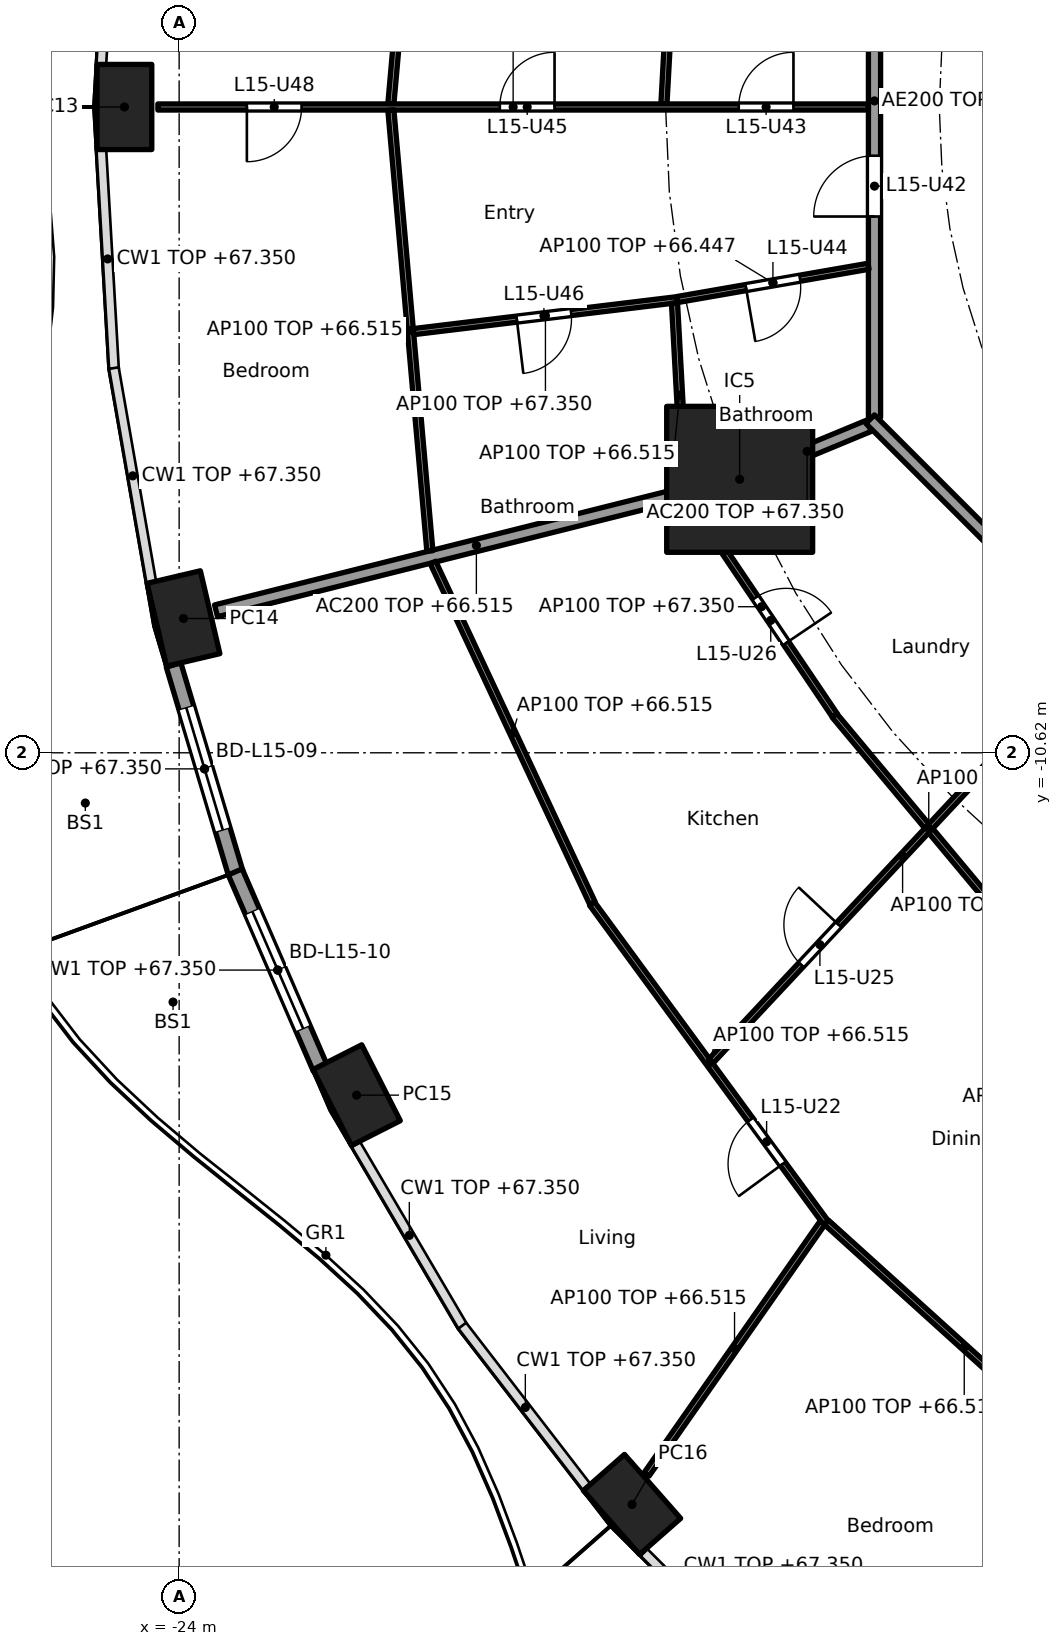
"""IFC4 building model, lengths in metres.
Left out: names, types, materials, properties, quantities, classifications, styles, units other than length and angle.
Written with IfcOpenShell. Run it as: python <this file> out.ifc"""

import sys

from ifc_helpers import new_model, si_unit, direction, frame, frame_2d, origin, origin_2d, place, context, subcontext, project, spatial, rectangle, hollow_rectangle, extrude, element, fill, save


model = new_model("IFC4")
c1 = context("Model", 3, precision=1e-05, world=origin(), true_north=direction((0.0, 1.0)))
c2 = subcontext(c1, "Body", "Model", "MODEL_VIEW")
j1 = project(units=[si_unit("LENGTHUNIT", "METRE"), si_unit("PLANEANGLEUNIT", "RADIAN")], contexts=[c1])
p1 = place(None, origin())
s1 = spatial("IfcSite", under=j1, at=p1, CompositionType="ELEMENT")
p2 = place(p1, origin())
s2 = spatial("IfcBuilding", under=s1, at=p2, CompositionType="ELEMENT")
p3 = place(p2, frame((0.0, 0.0, 64.0)))
s3 = spatial("IfcBuildingStorey", under=s2, at=p3, CompositionType="ELEMENT", Elevation=64.0)
for number, where, z_axis, x_axis in (
    (1, (-24.9, 0.0, 0.0), (0.0, 0.0, 1.0), (0.0, -1.0, 0.0)),
    (2, (-23.929, -8.412, 0.0), (0.0, 0.0, 1.0), (0.229, -0.973, 0.0)),
    (3, (-21.082, -16.25, 0.0), (0.0, 0.0, 1.0), (0.452, -0.892, 0.0)),
    (4, (-16.552, -22.981, 0.0), (0.0, 0.0, 1.0), (0.66, -0.751, 0.0)),
):
    element("IfcColumn", number, at=place(p3, frame(where, z_axis=z_axis, x_axis=x_axis)), inside=s3, PredefinedType="COLUMN", context=c2, shape_type="SweptSolid", body=[
        extrude(hollow_rectangle(XDim=1.4, YDim=0.9, WallThickness=0.05, at=origin_2d()), origin(), (0.0, 0.0, 1.0), 3.7),
    ])
p4 = place(p3, frame((-14.782, -6.123, 0.0), z_axis=(0.0, 0.0, 1.0), x_axis=(1.0, 0.0, 0.0)))
e5 = element("IfcColumn", 5, at=p4, inside=s3, PredefinedType="COLUMN", context=c2, shape_type="SweptSolid", body=[
    extrude(rectangle(XDim=2.4, YDim=2.4, at=origin_2d()), origin(), (0.0, 0.0, 1.0), 3.7),
])
p5 = place(p3, frame((-23.073, -12.593, 0.0), z_axis=(0.0, 0.0, 1.0), x_axis=(-0.285871309426, 0.958268018065, 0.0)))
e6 = element("IfcWall", 6, at=p5, inside=s3, PredefinedType="SOLIDWALL", context=c2, shape_type="SweptSolid", body=[
    extrude(rectangle(XDim=3.565, YDim=0.25, at=frame_2d((1.783, 0.0))), origin(), (0.0, 0.0, 1.0), 3.35),
])
p6 = place(p5, frame((0.733, 0.0, 0.0)))
e7 = element("IfcOpeningElement", 7, at=p6, cuts=e6, PredefinedType="OPENING", context=c2, shape_type="SweptSolid", body=[
    extrude(rectangle(XDim=2.1, YDim=2.4, at=frame_2d((1.05, 1.2))), frame((0.0, 0.135, 0.0), z_axis=(0.0, -1.0, 0.0), x_axis=(1.0, 0.0, 0.0)), (0.0, 0.0, 1.0), 0.27),
])
p7 = place(p3, frame((-21.678, -15.808, 0.0), z_axis=(0.0, 0.0, 1.0), x_axis=(-0.397624958345, 0.917548032803, 0.0)))
e8 = element("IfcWall", 8, at=p7, inside=s3, PredefinedType="SOLIDWALL", context=c2, shape_type="SweptSolid", body=[
    extrude(rectangle(XDim=3.52, YDim=0.25, at=frame_2d((1.76, 0.0))), origin(), (0.0, 0.0, 1.0), 3.35),
])
p8 = place(p7, frame((0.71, 0.0, 0.0)))
e9 = element("IfcOpeningElement", 9, at=p8, cuts=e8, PredefinedType="OPENING", context=c2, shape_type="SweptSolid", body=[
    extrude(rectangle(XDim=2.1, YDim=2.4, at=frame_2d((1.05, 1.2))), frame((0.0, 0.135, 0.0), z_axis=(0.0, -1.0, 0.0), x_axis=(1.0, 0.0, 0.0)), (0.0, 0.0, 1.0), 0.27),
])
p9 = place(p3, frame((-12.657, -5.243, 0.0), z_axis=(0.0, 0.0, 1.0), x_axis=(-0.923885664896, -0.382668627144, 0.0)))
e10 = element("IfcWall", 10, at=p9, inside=s3, PredefinedType="PARTITIONING", context=c2, shape_type="SweptSolid", body=[
    extrude(rectangle(XDim=2.2, YDim=0.2, at=frame_2d((1.1, 0.0))), origin(), (0.0, 0.0, 1.0), 3.35),
])
p10 = place(p3, frame((-14.831, -6.135, 0.0), z_axis=(0.0, 0.0, 1.0), x_axis=(-0.969884949569, -0.243563512454, 0.0)))
e11 = element("IfcWall", 11, at=p10, inside=s3, PredefinedType="PARTITIONING", context=c2, shape_type="SweptSolid", body=[
    extrude(rectangle(XDim=8.829, YDim=0.2, at=frame_2d((4.415, 0.0))), origin(), (0.0, 0.0, 1.0), 2.515),
])
p11 = place(p3, frame((-12.565, 5.304, 0.0), z_axis=(0.0, 0.0, 1.0), x_axis=(0.0, -1.0, 0.0)))
e12 = element("IfcWall", 12, at=p11, inside=s3, PredefinedType="PARTITIONING", context=c2, shape_type="SweptSolid", body=[
    extrude(rectangle(XDim=10.409, YDim=0.2, at=frame_2d((5.205, 0.0))), origin(), (0.0, 0.0, 1.0), 3.35),
])
p12 = place(p11, frame((6.106, 0.0, 0.0)))
e13 = element("IfcOpeningElement", 13, at=p12, cuts=e12, PredefinedType="OPENING", context=c2, shape_type="SweptSolid", body=[
    extrude(rectangle(XDim=1.0, YDim=2.1, at=frame_2d((0.5, 1.05))), frame((0.0, 0.11, 0.0), z_axis=(0.0, -1.0, 0.0), x_axis=(1.0, 0.0, 0.0)), (0.0, 0.0, 1.0), 0.22),
])
p13 = place(p3, frame((-12.635, -5.134, 0.0), z_axis=(0.0, 0.0, 1.0), x_axis=(0.707106781187, -0.707106781187, 0.0)))
e14 = element("IfcWall", 14, at=p13, inside=s3, PredefinedType="PARTITIONING", context=c2, shape_type="SweptSolid", body=[
    extrude(rectangle(XDim=10.609, YDim=0.2, at=frame_2d((5.305, 0.0))), origin(), (0.0, 0.0, 1.0), 3.35),
])
p14 = place(p3, frame((-15.686, 6.299, 0.0), z_axis=(0.0, 0.0, 1.0), x_axis=(-0.054651178503, -0.99850550759, 0.0)))
e15 = element("IfcWall", 15, at=p14, inside=s3, PredefinedType="PARTITIONING", context=c2, shape_type="SweptSolid", body=[
    extrude(rectangle(XDim=6.259, YDim=0.1, at=frame_2d((3.129, 0.0))), origin(), (0.0, 0.0, 1.0), 2.515),
])
p15 = place(p3, frame((-19.864, 7.45, 0.0), z_axis=(0.0, 0.0, 1.0), x_axis=(-0.088138375539, -0.996108240483, 0.0)))
e16 = element("IfcWall", 16, at=p15, inside=s3, PredefinedType="PARTITIONING", context=c2, shape_type="SweptSolid", body=[
    extrude(rectangle(XDim=7.429, YDim=0.1, at=frame_2d((3.714, 0.0))), origin(), (0.0, 0.0, 1.0), 2.515),
])
p16 = place(p15, frame((3.29, 0.0, 0.0)))
e17 = element("IfcOpeningElement", 17, at=p16, cuts=e16, PredefinedType="OPENING", context=c2, shape_type="SweptSolid", body=[
    extrude(rectangle(XDim=0.9, YDim=2.1, at=frame_2d((0.45, 1.05))), frame((0.0, 0.06, 0.0), z_axis=(0.0, -1.0, 0.0), x_axis=(1.0, 0.0, 0.0)), (0.0, 0.0, 1.0), 0.12),
])
p17 = place(p3, frame((-12.665, 0.0, 0.0), z_axis=(0.0, 0.0, 1.0), x_axis=(-1.0, 0.0, 0.0)))
e18 = element("IfcWall", 18, at=p17, inside=s3, PredefinedType="PARTITIONING", context=c2, shape_type="SweptSolid", body=[
    extrude(rectangle(XDim=11.685, YDim=0.1, at=frame_2d((5.843, 0.0))), origin(), (0.0, 0.0, 1.0), 2.447),
])
p18 = place(p17, frame((1.233, 0.0, 0.0)))
e19 = element("IfcOpeningElement", 19, at=p18, cuts=e18, PredefinedType="OPENING", context=c2, shape_type="SweptSolid", body=[
    extrude(rectangle(XDim=0.9, YDim=2.1, at=frame_2d((0.45, 1.05))), frame((0.0, 0.06, 0.0), z_axis=(0.0, -1.0, 0.0), x_axis=(1.0, 0.0, 0.0)), (0.0, 0.0, 1.0), 0.12),
])
p19 = place(p17, frame((5.162, 0.0, 0.0)))
e20 = element("IfcOpeningElement", 20, at=p19, cuts=e18, PredefinedType="OPENING", context=c2, shape_type="SweptSolid", body=[
    extrude(rectangle(XDim=0.9, YDim=2.1, at=frame_2d((0.45, 1.05))), frame((0.0, 0.06, 0.0), z_axis=(0.0, -1.0, 0.0), x_axis=(1.0, 0.0, 0.0)), (0.0, 0.0, 1.0), 0.12),
])
p20 = place(p17, frame((9.322, 0.0, 0.0)))
e21 = element("IfcOpeningElement", 21, at=p20, cuts=e18, PredefinedType="OPENING", context=c2, shape_type="SweptSolid", body=[
    extrude(rectangle(XDim=0.9, YDim=2.1, at=frame_2d((0.45, 1.05))), frame((0.0, 0.06, 0.0), z_axis=(0.0, -1.0, 0.0), x_axis=(1.0, 0.0, 0.0)), (0.0, 0.0, 1.0), 0.12),
])
p21 = place(p3, frame((-20.518, -0.05, 0.0), z_axis=(0.0, 0.0, 1.0), x_axis=(0.088143415068, -0.996107794558, 0.0)))
e22 = element("IfcWall", 22, at=p21, inside=s3, PredefinedType="PARTITIONING", context=c2, shape_type="SweptSolid", body=[
    extrude(rectangle(XDim=7.279, YDim=0.1, at=frame_2d((3.64, 0.0))), origin(), (0.0, 0.0, 1.0), 2.515),
])
p22 = place(p3, frame((-12.663, -2.619, 0.0), z_axis=(0.0, 0.0, 1.0), x_axis=(-0.985220176102, -0.171292745325, 0.0)))
e23 = element("IfcWall", 23, at=p22, inside=s3, PredefinedType="PARTITIONING", context=c2, shape_type="SweptSolid", body=[
    extrude(rectangle(XDim=3.191, YDim=0.1, at=frame_2d((1.596, 0.0))), origin(), (0.0, 0.0, 1.0), 2.447),
])
p23 = place(p22, frame((1.146, 0.0, 0.0)))
e24 = element("IfcOpeningElement", 24, at=p23, cuts=e23, PredefinedType="OPENING", context=c2, shape_type="SweptSolid", body=[
    extrude(rectangle(XDim=0.9, YDim=2.1, at=frame_2d((0.45, 1.05))), frame((0.0, 0.06, 0.0), z_axis=(0.0, -1.0, 0.0), x_axis=(1.0, 0.0, 0.0)), (0.0, 0.0, 1.0), 0.12),
])
p24 = place(p3, frame((-15.807, -3.168, 0.0), z_axis=(0.0, 0.0, 1.0), x_axis=(-0.992741666002, -0.120266306938, 0.0)))
e25 = element("IfcWall", 25, at=p24, inside=s3, PredefinedType="PARTITIONING", context=c2, shape_type="SweptSolid", body=[
    extrude(rectangle(XDim=4.371, YDim=0.1, at=frame_2d((2.185, 0.0))), origin(), (0.0, 0.0, 1.0), 3.35),
])
p25 = place(p24, frame((1.76, 0.0, 0.0)))
e26 = element("IfcOpeningElement", 26, at=p25, cuts=e25, PredefinedType="OPENING", context=c2, shape_type="SweptSolid", body=[
    extrude(rectangle(XDim=0.9, YDim=2.1, at=frame_2d((0.45, 1.05))), frame((0.0, 0.06, 0.0), z_axis=(0.0, -1.0, 0.0), x_axis=(1.0, 0.0, 0.0)), (0.0, 0.0, 1.0), 0.12),
])
p26 = place(p3, frame((-15.854, -3.225, 0.0), z_axis=(0.0, 0.0, 1.0), x_axis=(0.054644199943, -0.998505889523, 0.0)))
e27 = element("IfcWall", 27, at=p26, inside=s3, PredefinedType="PARTITIONING", context=c2, shape_type="SweptSolid", body=[
    extrude(rectangle(XDim=3.029, YDim=0.1, at=frame_2d((1.515, 0.0))), origin(), (0.0, 0.0, 1.0), 2.515),
])
p27 = place(p3, frame((-15.627, -6.432, 0.0), z_axis=(0.0, 0.0, 1.0), x_axis=(0.559112679527, -0.829091678641, 0.0)))
e28 = element("IfcWall", 28, at=p27, inside=s3, PredefinedType="PARTITIONING", context=c2, shape_type="SweptSolid", body=[
    extrude(rectangle(XDim=4.308, YDim=0.1, at=frame_2d((2.154, 0.0))), origin(), (0.0, 0.0, 1.0), 3.35),
])
p28 = place(p27, frame((1.975, 0.0, 0.0)))
e29 = element("IfcOpeningElement", 29, at=p28, cuts=e28, PredefinedType="OPENING", context=c2, shape_type="SweptSolid", body=[
    extrude(rectangle(XDim=0.9, YDim=2.1, at=frame_2d((0.45, 1.05))), frame((0.0, 0.06, 0.0), z_axis=(0.0, -1.0, 0.0), x_axis=(1.0, 0.0, 0.0)), (0.0, 0.0, 1.0), 0.12),
])
p29 = place(p3, frame((-19.826, -7.491, 0.0), z_axis=(0.0, 0.0, 1.0), x_axis=(0.423926333401, -0.905696673202, 0.0)))
e30 = element("IfcWall", 30, at=p29, inside=s3, PredefinedType="PARTITIONING", context=c2, shape_type="SweptSolid", body=[
    extrude(rectangle(XDim=6.188, YDim=0.1, at=frame_2d((3.094, 0.0))), origin(), (0.0, 0.0, 1.0), 2.515),
])
p30 = place(p3, frame((-13.222, -10.007, 0.0), z_axis=(0.0, 0.0, 1.0), x_axis=(0.64083455704, -0.767679015282, 0.0)))
e31 = element("IfcWall", 31, at=p30, inside=s3, PredefinedType="PARTITIONING", context=c2, shape_type="SweptSolid", body=[
    extrude(rectangle(XDim=4.837, YDim=0.1, at=frame_2d((2.418, 0.0))), origin(), (0.0, 0.0, 1.0), 2.515),
])
p31 = place(p3, frame((-17.211, -13.1, 0.0), z_axis=(0.0, 0.0, 1.0), x_axis=(0.591191311491, -0.806531359104, 0.0)))
e32 = element("IfcWall", 32, at=p31, inside=s3, PredefinedType="PARTITIONING", context=c2, shape_type="SweptSolid", body=[
    extrude(rectangle(XDim=6.51, YDim=0.1, at=frame_2d((3.255, 0.0))), origin(), (0.0, 0.0, 1.0), 2.515),
])
p32 = place(p31, frame((4.407, 0.0, 0.0)))
e33 = element("IfcOpeningElement", 33, at=p32, cuts=e32, PredefinedType="OPENING", context=c2, shape_type="SweptSolid", body=[
    extrude(rectangle(XDim=0.9, YDim=2.1, at=frame_2d((0.45, 1.05))), frame((0.0, 0.06, 0.0), z_axis=(0.0, -1.0, 0.0), x_axis=(1.0, 0.0, 0.0)), (0.0, 0.0, 1.0), 0.12),
])
p33 = place(p3, frame((-8.953, -8.958, 0.0), z_axis=(0.0, 0.0, 1.0), x_axis=(-0.683322485948, -0.730116689439, 0.0)))
e34 = element("IfcWall", 34, at=p33, inside=s3, PredefinedType="PARTITIONING", context=c2, shape_type="SweptSolid", body=[
    extrude(rectangle(XDim=9.219, YDim=0.1, at=frame_2d((4.609, 0.0))), origin(), (0.0, 0.0, 1.0), 2.447),
])
p34 = place(p33, frame((6.149, 0.0, 0.0)))
e35 = element("IfcOpeningElement", 35, at=p34, cuts=e34, PredefinedType="OPENING", context=c2, shape_type="SweptSolid", body=[
    extrude(rectangle(XDim=0.9, YDim=2.1, at=frame_2d((0.45, 1.05))), frame((0.0, 0.06, 0.0), z_axis=(0.0, -1.0, 0.0), x_axis=(1.0, 0.0, 0.0)), (0.0, 0.0, 1.0), 0.12),
])
p35 = place(p3, frame((-13.42, -18.351, 0.0), z_axis=(0.0, 0.0, 1.0), x_axis=(-0.573127875153, -0.819465947262, 0.0)))
e36 = element("IfcWall", 36, at=p35, inside=s3, PredefinedType="PARTITIONING", context=c2, shape_type="SweptSolid", body=[
    extrude(rectangle(XDim=5.047, YDim=0.1, at=frame_2d((2.523, 0.0))), origin(), (0.0, 0.0, 1.0), 2.515),
])
p36 = place(p3, frame((-13.355, -18.343, 0.0), z_axis=(0.0, 0.0, 1.0), x_axis=(0.741722263338, -0.670707152242, 0.0)))
e37 = element("IfcWall", 37, at=p36, inside=s3, PredefinedType="PARTITIONING", context=c2, shape_type="SweptSolid", body=[
    extrude(rectangle(XDim=6.109, YDim=0.1, at=frame_2d((3.055, 0.0))), origin(), (0.0, 0.0, 1.0), 2.515),
])
p37 = place(p6, origin())
e38 = element("IfcDoor", 38, at=p37, inside=s3, OperationType="SLIDING_TO_LEFT", PredefinedType="DOOR", context=c2, shape_type="SweptSolid", body=[
    extrude(rectangle(XDim=2.1, YDim=2.4, at=frame_2d((1.05, 1.2))), frame((0.0, 0.025, 0.0), z_axis=(0.0, -1.0, 0.0), x_axis=(1.0, 0.0, 0.0)), (0.0, 0.0, 1.0), 0.05),
])
fill(e7, e38)
p38 = place(p8, origin())
e39 = element("IfcDoor", 39, at=p38, inside=s3, OperationType="SLIDING_TO_LEFT", PredefinedType="DOOR", context=c2, shape_type="SweptSolid", body=[
    extrude(rectangle(XDim=2.1, YDim=2.4, at=frame_2d((1.05, 1.2))), frame((0.0, 0.025, 0.0), z_axis=(0.0, -1.0, 0.0), x_axis=(1.0, 0.0, 0.0)), (0.0, 0.0, 1.0), 0.05),
])
fill(e9, e39)
p39 = place(p32, frame((0.9, 0.0, 0.0), x_axis=(-1.0, 0.0, 0.0)))
e40 = element("IfcDoor", 40, at=p39, inside=s3, OperationType="SINGLE_SWING_LEFT", PredefinedType="DOOR", context=c2, shape_type="SweptSolid", body=[
    extrude(rectangle(XDim=0.9, YDim=2.1, at=frame_2d((0.45, 1.05))), frame((0.0, 0.025, 0.0), z_axis=(0.0, -1.0, 0.0), x_axis=(1.0, 0.0, 0.0)), (0.0, 0.0, 1.0), 0.05),
])
fill(e33, e40)
p40 = place(p34, frame((0.9, 0.0, 0.0), x_axis=(-1.0, 0.0, 0.0)))
e41 = element("IfcDoor", 41, at=p40, inside=s3, OperationType="SINGLE_SWING_RIGHT", PredefinedType="DOOR", context=c2, shape_type="SweptSolid", body=[
    extrude(rectangle(XDim=0.9, YDim=2.1, at=frame_2d((0.45, 1.05))), frame((0.0, 0.025, 0.0), z_axis=(0.0, -1.0, 0.0), x_axis=(1.0, 0.0, 0.0)), (0.0, 0.0, 1.0), 0.05),
])
fill(e35, e41)
p41 = place(p28, origin())
e42 = element("IfcDoor", 42, at=p41, inside=s3, OperationType="SINGLE_SWING_RIGHT", PredefinedType="DOOR", context=c2, shape_type="SweptSolid", body=[
    extrude(rectangle(XDim=0.9, YDim=2.1, at=frame_2d((0.45, 1.05))), frame((0.0, 0.025, 0.0), z_axis=(0.0, -1.0, 0.0), x_axis=(1.0, 0.0, 0.0)), (0.0, 0.0, 1.0), 0.05),
])
fill(e29, e42)
p42 = place(p12, frame((1.0, 0.0, 0.0), x_axis=(-1.0, 0.0, 0.0)))
e43 = element("IfcDoor", 43, at=p42, inside=s3, OperationType="SINGLE_SWING_LEFT", PredefinedType="DOOR", context=c2, shape_type="SweptSolid", body=[
    extrude(rectangle(XDim=1.0, YDim=2.1, at=frame_2d((0.5, 1.05))), frame((0.0, 0.025, 0.0), z_axis=(0.0, -1.0, 0.0), x_axis=(1.0, 0.0, 0.0)), (0.0, 0.0, 1.0), 0.05),
])
fill(e13, e43)
p43 = place(p18, frame((0.9, 0.0, 0.0), x_axis=(-1.0, 0.0, 0.0)))
e44 = element("IfcDoor", 44, at=p43, inside=s3, OperationType="SINGLE_SWING_RIGHT", PredefinedType="DOOR", context=c2, shape_type="SweptSolid", body=[
    extrude(rectangle(XDim=0.9, YDim=2.1, at=frame_2d((0.45, 1.05))), frame((0.0, 0.025, 0.0), z_axis=(0.0, -1.0, 0.0), x_axis=(1.0, 0.0, 0.0)), (0.0, 0.0, 1.0), 0.05),
])
fill(e19, e44)
p44 = place(p23, origin())
e45 = element("IfcDoor", 45, at=p44, inside=s3, OperationType="SINGLE_SWING_RIGHT", PredefinedType="DOOR", context=c2, shape_type="SweptSolid", body=[
    extrude(rectangle(XDim=0.9, YDim=2.1, at=frame_2d((0.45, 1.05))), frame((0.0, 0.025, 0.0), z_axis=(0.0, -1.0, 0.0), x_axis=(1.0, 0.0, 0.0)), (0.0, 0.0, 1.0), 0.05),
])
fill(e24, e45)
p45 = place(p19, frame((0.9, 0.0, 0.0), x_axis=(-1.0, 0.0, 0.0)))
e46 = element("IfcDoor", 46, at=p45, inside=s3, OperationType="SINGLE_SWING_RIGHT", PredefinedType="DOOR", context=c2, shape_type="SweptSolid", body=[
    extrude(rectangle(XDim=0.9, YDim=2.1, at=frame_2d((0.45, 1.05))), frame((0.0, 0.025, 0.0), z_axis=(0.0, -1.0, 0.0), x_axis=(1.0, 0.0, 0.0)), (0.0, 0.0, 1.0), 0.05),
])
fill(e20, e46)
p46 = place(p25, origin())
e47 = element("IfcDoor", 47, at=p46, inside=s3, OperationType="SINGLE_SWING_RIGHT", PredefinedType="DOOR", context=c2, shape_type="SweptSolid", body=[
    extrude(rectangle(XDim=0.9, YDim=2.1, at=frame_2d((0.45, 1.05))), frame((0.0, 0.025, 0.0), z_axis=(0.0, -1.0, 0.0), x_axis=(1.0, 0.0, 0.0)), (0.0, 0.0, 1.0), 0.05),
])
fill(e26, e47)
p47 = place(p20, origin())
e48 = element("IfcDoor", 48, at=p47, inside=s3, OperationType="SINGLE_SWING_RIGHT", PredefinedType="DOOR", context=c2, shape_type="SweptSolid", body=[
    extrude(rectangle(XDim=0.9, YDim=2.1, at=frame_2d((0.45, 1.05))), frame((0.0, 0.025, 0.0), z_axis=(0.0, -1.0, 0.0), x_axis=(1.0, 0.0, 0.0)), (0.0, 0.0, 1.0), 0.05),
])
fill(e21, e48)
save(model, sys.argv[1])
